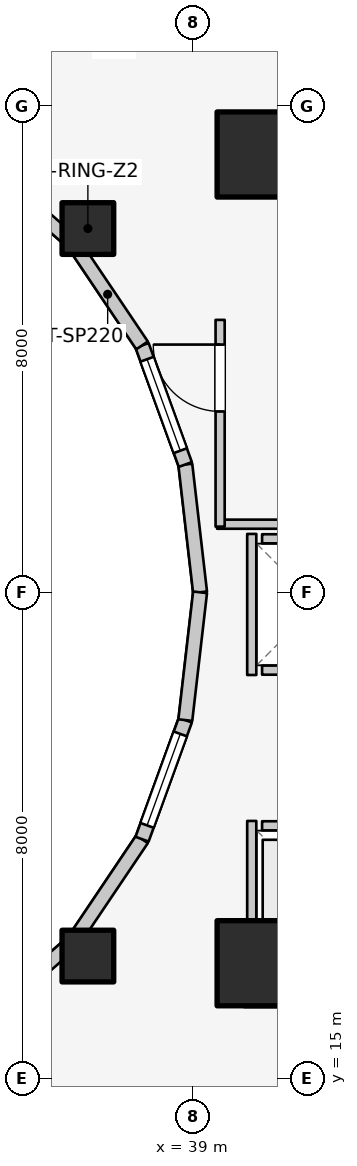
"""IFC4 building model, lengths in metres.
Left out: names, types, materials, properties, quantities, classifications, styles, units other than length and angle.
Written with IfcOpenShell. Run it as: python <this file> out.ifc"""

import sys

from ifc_helpers import new_model, si_unit, direction, frame, frame_2d, origin, origin_2d, place, context, subcontext, project, spatial, rectangle, extrude, element, fill, save


model = new_model("IFC4")
c1 = context("Model", 3, precision=1e-05, world=origin(), true_north=direction((0.0, 1.0)))
c2 = subcontext(c1, "Body", "Model", "MODEL_VIEW")
j1 = project(units=[si_unit("LENGTHUNIT", "METRE"), si_unit("PLANEANGLEUNIT", "RADIAN")], contexts=[c1])
p1 = place(None, origin())
s1 = spatial("IfcSite", under=j1, at=p1, CompositionType="ELEMENT")
p2 = place(p1, origin())
s2 = spatial("IfcBuilding", under=s1, at=p2, CompositionType="ELEMENT")
p3 = place(p2, frame((0.0, 0.0, 104.2)))
s3 = spatial("IfcBuildingStorey", under=s2, at=p3, CompositionType="ELEMENT", Elevation=104.2)
for number, where, z_axis, x_axis in (
    (1, (39.85, 16.55, 0.0), (0.0, 0.0, 1.0), (1.0, 0.0, 0.0)),
    (2, (39.85, 30.35, 0.0), (0.0, 0.0, 1.0), (1.0, 0.0, 0.0)),
):
    element("IfcWall", number, at=place(p3, frame(where, z_axis=z_axis, x_axis=x_axis)), inside=s3, PredefinedType="SHEAR", context=c2, shape_type="SweptSolid", body=[
        extrude(rectangle(XDim=4.5, YDim=0.7, at=frame_2d((2.25, 0.0))), origin(), (0.0, 0.0, 1.0), 3.1),
    ])
for number, where, z_axis, x_axis in (
    (3, (40.1, 16.9, 0.0), (0.0, 0.0, 1.0), (1.0, 0.0, 0.0)),
    (4, (40.1, 30.2, 0.0), (0.0, 0.0, 1.0), (1.0, 0.0, 0.0)),
):
    element("IfcColumn", number, at=place(p3, frame(where, z_axis=z_axis, x_axis=x_axis)), inside=s3, PredefinedType="COLUMN", context=c2, shape_type="SweptSolid", body=[
        extrude(rectangle(XDim=1.4, YDim=1.4, at=origin_2d()), origin(), (0.0, 0.0, 1.0), 3.1),
    ])
for number, where, z_axis, x_axis in (
    (5, (37.275, 28.982, 0.0), (0.0, 0.0, 1.0), (1.0, 0.0, 0.0)),
    (6, (37.275, 17.018, 0.0), (0.0, 0.0, 1.0), (1.0, 0.0, 0.0)),
):
    element("IfcColumn", number, at=place(p3, frame(where, z_axis=z_axis, x_axis=x_axis)), inside=s3, PredefinedType="COLUMN", context=c2, shape_type="SweptSolid", body=[
        extrude(rectangle(XDim=0.85, YDim=0.85, at=origin_2d()), origin(), (0.0, 0.0, 1.0), 3.1),
    ])
p4 = place(p3, frame((39.12, 23.0, 0.0), z_axis=(0.0, 0.0, 1.0), x_axis=(-0.114711713601, 0.993398823617, 0.0)))
e7 = element("IfcWall", 7, at=p4, inside=s3, PredefinedType="STANDARD", context=c2, shape_type="SweptSolid", body=[
    extrude(rectangle(XDim=2.115, YDim=0.23, at=frame_2d((1.058, 0.0))), origin(), (0.0, 0.0, 1.0), 2.84),
])
p5 = place(p3, frame((38.877, 25.102, 0.0), z_axis=(0.0, 0.0, 1.0), x_axis=(-0.341423187295, 0.93990968033, 0.0)))
e8 = element("IfcWall", 8, at=p5, inside=s3, PredefinedType="STANDARD", context=c2, shape_type="SweptSolid", body=[
    extrude(rectangle(XDim=2.084, YDim=0.23, at=frame_2d((1.042, 0.0))), origin(), (0.0, 0.0, 1.0), 2.84),
])
p6 = place(p5, frame((0.242, 0.0, 0.85)))
e9 = element("IfcOpeningElement", 9, at=p6, cuts=e8, PredefinedType="OPENING", context=c2, shape_type="SweptSolid", body=[
    extrude(rectangle(XDim=1.6, YDim=1.65, at=frame_2d((0.8, 0.825))), frame((0.0, 0.125, 0.0), z_axis=(0.0, -1.0, 0.0), x_axis=(1.0, 0.0, 0.0)), (0.0, 0.0, 1.0), 0.25),
])
p7 = place(p3, frame((38.166, 27.06, 0.0), z_axis=(0.0, 0.0, 1.0), x_axis=(-0.558197800898, 0.829707909492, 0.0)))
e10 = element("IfcWall", 10, at=p7, inside=s3, PredefinedType="STANDARD", context=c2, shape_type="SweptSolid", body=[
    extrude(rectangle(XDim=2.027, YDim=0.23, at=frame_2d((1.013, 0.0))), origin(), (0.0, 0.0, 1.0), 2.16),
])
for number, where, z_axis, x_axis in (
    (11, (37.035, 28.742, 0.0), (0.0, 0.0, 1.0), (-0.753, 0.659, 0.0)),
    (12, (35.56, 15.968, 0.0), (0.0, 0.0, 1.0), (0.753, 0.659, 0.0)),
):
    element("IfcWall", number, at=place(p3, frame(where, z_axis=z_axis, x_axis=x_axis)), inside=s3, PredefinedType="STANDARD", context=c2, shape_type="SweptSolid", body=[
        extrude(rectangle(XDim=1.959, YDim=0.23, at=frame_2d((0.98, 0.0))), origin(), (0.0, 0.0, 1.0), 2.16),
    ])
p8 = place(p3, frame((37.035, 17.258, 0.0), z_axis=(0.0, 0.0, 1.0), x_axis=(0.558197800898, 0.829707909492, 0.0)))
e13 = element("IfcWall", 13, at=p8, inside=s3, PredefinedType="STANDARD", context=c2, shape_type="SweptSolid", body=[
    extrude(rectangle(XDim=2.027, YDim=0.23, at=frame_2d((1.013, 0.0))), origin(), (0.0, 0.0, 1.0), 2.16),
])
p9 = place(p3, frame((38.166, 18.94, 0.0), z_axis=(0.0, 0.0, 1.0), x_axis=(0.341423187295, 0.93990968033, 0.0)))
e14 = element("IfcWall", 14, at=p9, inside=s3, PredefinedType="STANDARD", context=c2, shape_type="SweptSolid", body=[
    extrude(rectangle(XDim=2.084, YDim=0.23, at=frame_2d((1.042, 0.0))), origin(), (0.0, 0.0, 1.0), 2.84),
])
p10 = place(p9, frame((0.242, 0.0, 0.85)))
e15 = element("IfcOpeningElement", 15, at=p10, cuts=e14, PredefinedType="OPENING", context=c2, shape_type="SweptSolid", body=[
    extrude(rectangle(XDim=1.6, YDim=1.65, at=frame_2d((0.8, 0.825))), frame((0.0, 0.125, 0.0), z_axis=(0.0, -1.0, 0.0), x_axis=(1.0, 0.0, 0.0)), (0.0, 0.0, 1.0), 0.25),
])
p11 = place(p3, frame((38.877, 20.898, 0.0), z_axis=(0.0, 0.0, 1.0), x_axis=(0.114711713601, 0.993398823617, 0.0)))
e16 = element("IfcWall", 16, at=p11, inside=s3, PredefinedType="STANDARD", context=c2, shape_type="SweptSolid", body=[
    extrude(rectangle(XDim=2.115, YDim=0.23, at=frame_2d((1.058, 0.0))), origin(), (0.0, 0.0, 1.0), 2.84),
])
p12 = place(p3, frame((40.14, 19.16, 0.0), z_axis=(0.0, 0.0, 1.0), x_axis=(1.0, 0.0, 0.0)))
e17 = element("IfcWall", 17, at=p12, inside=s3, PredefinedType="SOLIDWALL", context=c2, shape_type="SweptSolid", body=[
    extrude(rectangle(XDim=1.82, YDim=0.15, at=frame_2d((0.91, 0.0))), origin(), (0.0, 0.0, 1.0), 2.12),
])
p13 = place(p12, frame((0.36, 0.0, 0.0)))
e18 = element("IfcOpeningElement", 18, at=p13, cuts=e17, PredefinedType="OPENING", context=c2, shape_type="SweptSolid", body=[
    extrude(rectangle(XDim=1.1, YDim=2.1, at=frame_2d((0.55, 1.05))), frame((0.0, 0.085, 0.0), z_axis=(0.0, -1.0, 0.0), x_axis=(1.0, 0.0, 0.0)), (0.0, 0.0, 1.0), 0.17),
])
p14 = place(p3, frame((40.14, 17.1, 0.0), z_axis=(0.0, 0.0, 1.0), x_axis=(1.0, 0.0, 0.0)))
e19 = element("IfcWall", 19, at=p14, inside=s3, PredefinedType="SOLIDWALL", context=c2, shape_type="SweptSolid", body=[
    extrude(rectangle(XDim=1.82, YDim=0.15, at=frame_2d((0.91, 0.0))), origin(), (0.0, 0.0, 1.0), 2.12),
])
p15 = place(p3, frame((39.97, 17.02, 0.0), z_axis=(0.0, 0.0, 1.0), x_axis=(0.0, 1.0, 0.0)))
e20 = element("IfcWall", 20, at=p15, inside=s3, PredefinedType="SOLIDWALL", context=c2, shape_type="SweptSolid", body=[
    extrude(rectangle(XDim=2.22, YDim=0.15, at=frame_2d((1.11, 0.0))), origin(), (0.0, 0.0, 1.0), 2.12),
])
for number, where, z_axis, x_axis in (
    (21, (40.14, 21.72, 0.0), (0.0, 0.0, 1.0), (1.0, 0.0, 0.0)),
    (22, (40.14, 23.88, 0.0), (0.0, 0.0, 1.0), (1.0, 0.0, 0.0)),
):
    element("IfcWall", number, at=place(p3, frame(where, z_axis=z_axis, x_axis=x_axis)), inside=s3, PredefinedType="SOLIDWALL", context=c2, shape_type="SweptSolid", body=[
        extrude(rectangle(XDim=1.82, YDim=0.15, at=frame_2d((0.91, 0.0))), origin(), (0.0, 0.0, 1.0), 2.12),
    ])
p16 = place(p3, frame((39.97, 21.64, 0.0), z_axis=(0.0, 0.0, 1.0), x_axis=(0.0, 1.0, 0.0)))
e23 = element("IfcWall", 23, at=p16, inside=s3, PredefinedType="SOLIDWALL", context=c2, shape_type="SweptSolid", body=[
    extrude(rectangle(XDim=2.32, YDim=0.15, at=frame_2d((1.16, 0.0))), origin(), (0.0, 0.0, 1.0), 2.12),
])
p17 = place(p3, frame((39.4, 24.12, 0.0), z_axis=(0.0, 0.0, 1.0), x_axis=(1.0, 0.0, 0.0)))
e24 = element("IfcWall", 24, at=p17, inside=s3, PredefinedType="PARTITIONING", context=c2, shape_type="SweptSolid", body=[
    extrude(rectangle(XDim=5.08, YDim=0.15, at=frame_2d((2.54, 0.0))), origin(), (0.0, 0.0, 1.0), 2.12),
])
p18 = place(p3, frame((39.45, 24.08, 0.0), z_axis=(0.0, 0.0, 1.0), x_axis=(0.0, 1.0, 0.0)))
e25 = element("IfcWall", 25, at=p18, inside=s3, PredefinedType="PARTITIONING", context=c2, shape_type="SweptSolid", body=[
    extrude(rectangle(XDim=3.4, YDim=0.15, at=frame_2d((1.7, 0.0))), origin(), (0.0, 0.0, 1.0), 2.855),
])
p19 = place(p18, frame((1.894, 0.0, 0.0)))
e26 = element("IfcOpeningElement", 26, at=p19, cuts=e25, PredefinedType="OPENING", context=c2, shape_type="SweptSolid", body=[
    extrude(rectangle(XDim=1.1, YDim=2.1, at=frame_2d((0.55, 1.05))), frame((0.0, 0.085, 0.0), z_axis=(0.0, -1.0, 0.0), x_axis=(1.0, 0.0, 0.0)), (0.0, 0.0, 1.0), 0.17),
])
p20 = place(p6, origin())
e27 = element("IfcWindow", 27, at=p20, inside=s3, PartitioningType="SINGLE_PANEL", PredefinedType="WINDOW", context=c2, shape_type="SweptSolid", body=[
    extrude(rectangle(XDim=1.6, YDim=1.65, at=frame_2d((0.8, 0.825))), frame((0.0, 0.03, 0.0), z_axis=(0.0, -1.0, 0.0), x_axis=(1.0, 0.0, 0.0)), (0.0, 0.0, 1.0), 0.06),
])
fill(e9, e27)
p21 = place(p10, origin())
e28 = element("IfcWindow", 28, at=p21, inside=s3, PartitioningType="SINGLE_PANEL", PredefinedType="WINDOW", context=c2, shape_type="SweptSolid", body=[
    extrude(rectangle(XDim=1.6, YDim=1.65, at=frame_2d((0.8, 0.825))), frame((0.0, 0.03, 0.0), z_axis=(0.0, -1.0, 0.0), x_axis=(1.0, 0.0, 0.0)), (0.0, 0.0, 1.0), 0.06),
])
fill(e15, e28)
p22 = place(p19, origin())
e29 = element("IfcDoor", 29, at=p22, inside=s3, OperationType="SINGLE_SWING_RIGHT", PredefinedType="DOOR", context=c2, shape_type="SweptSolid", body=[
    extrude(rectangle(XDim=1.1, YDim=2.1, at=frame_2d((0.55, 1.05))), frame((0.0, 0.025, 0.0), z_axis=(0.0, -1.0, 0.0), x_axis=(1.0, 0.0, 0.0)), (0.0, 0.0, 1.0), 0.05),
])
fill(e26, e29)
save(model, sys.argv[1])
